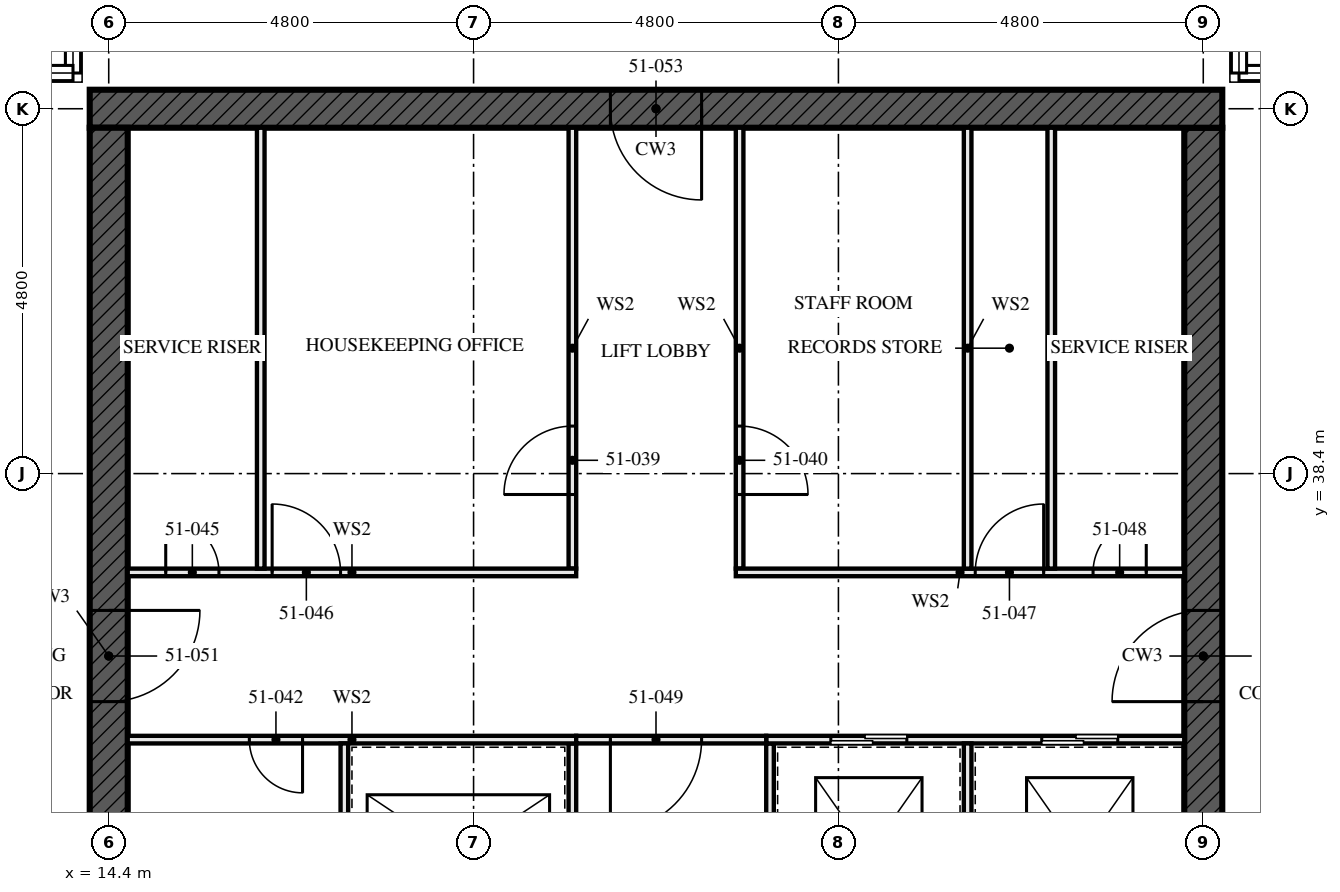
"""IFC4 building model, lengths in metres.
Left out: names, types, materials, properties, quantities, classifications, styles, units other than length and angle.
Written with IfcOpenShell. Run it as: python <this file> out.ifc"""

import sys

from ifc_helpers import new_model, si_unit, direction, frame, frame_2d, origin, place, context, subcontext, project, spatial, rectangle, extrude, element, fill, save


model = new_model("IFC4")
c1 = context("Model", 3, precision=1e-05, world=origin(), true_north=direction((0.0, 1.0)))
c2 = subcontext(c1, "Body", "Model", "MODEL_VIEW")
j1 = project(units=[si_unit("LENGTHUNIT", "METRE"), si_unit("PLANEANGLEUNIT", "RADIAN")], contexts=[c1])
p1 = place(None, origin())
s1 = spatial("IfcSite", under=j1, at=p1, CompositionType="ELEMENT")
p2 = place(p1, origin())
s2 = spatial("IfcBuilding", under=s1, at=p2, CompositionType="ELEMENT")
p3 = place(p2, frame((0.0, 0.0, 186.5)))
s3 = spatial("IfcBuildingStorey", under=s2, at=p3, CompositionType="ELEMENT", Elevation=186.5)
p4 = place(p3, frame((29.05, 43.2, -0.17), z_axis=(0.0, 0.0, 1.0), x_axis=(-1.0, 0.0, 0.0)))
e1 = element("IfcWall", 1, at=p4, inside=s3, PredefinedType="SHEAR", context=c2, shape_type="SweptSolid", body=[
    extrude(rectangle(XDim=14.9, YDim=0.5, at=frame_2d((7.45, 0.0))), origin(), (0.0, 0.0, 1.0), 3.42),
])
p5 = place(p4, frame((6.85, 0.0, 0.17)))
e2 = element("IfcOpeningElement", 2, at=p5, cuts=e1, PredefinedType="OPENING", context=c2, shape_type="SweptSolid", body=[
    extrude(rectangle(XDim=1.2, YDim=2.1, at=frame_2d((0.6, 1.05))), frame((0.0, 0.26, 0.0), z_axis=(0.0, -1.0, 0.0), x_axis=(1.0, 0.0, 0.0)), (0.0, 0.0, 1.0), 0.521),
])
p6 = place(p3, frame((14.4, 42.95, -0.17), z_axis=(0.0, 0.0, 1.0), x_axis=(0.0, -1.0, 0.0)))
e3 = element("IfcWall", 3, at=p6, inside=s3, PredefinedType="SHEAR", context=c2, shape_type="SweptSolid", body=[
    extrude(rectangle(XDim=13.9, YDim=0.5, at=frame_2d((6.95, 0.0))), origin(), (0.0, 0.0, 1.0), 3.42),
])
p7 = place(p6, frame((6.35, 0.0, 0.17)))
e4 = element("IfcOpeningElement", 4, at=p7, cuts=e3, PredefinedType="OPENING", context=c2, shape_type="SweptSolid", body=[
    extrude(rectangle(XDim=1.2, YDim=2.1, at=frame_2d((0.6, 1.05))), frame((0.0, 0.26, 0.0), z_axis=(0.0, -1.0, 0.0), x_axis=(1.0, 0.0, 0.0)), (0.0, 0.0, 1.0), 0.521),
])
p8 = place(p3, frame((28.8, 29.05, -0.17), z_axis=(0.0, 0.0, 1.0), x_axis=(0.0, 1.0, 0.0)))
e5 = element("IfcWall", 5, at=p8, inside=s3, PredefinedType="SHEAR", context=c2, shape_type="SweptSolid", body=[
    extrude(rectangle(XDim=13.9, YDim=0.5, at=frame_2d((6.95, 0.0))), origin(), (0.0, 0.0, 1.0), 3.42),
])
p9 = place(p8, frame((6.35, 0.0, 0.17)))
e6 = element("IfcOpeningElement", 6, at=p9, cuts=e5, PredefinedType="OPENING", context=c2, shape_type="SweptSolid", body=[
    extrude(rectangle(XDim=1.2, YDim=2.1, at=frame_2d((0.6, 1.05))), frame((0.0, 0.26, 0.0), z_axis=(0.0, -1.0, 0.0), x_axis=(1.0, 0.0, 0.0)), (0.0, 0.0, 1.0), 0.521),
])
for number, where, z_axis, x_axis in (
    (7, (16.4, 37.15, 0.0), (0.0, 0.0, 1.0), (0.0, 1.0, 0.0)),
    (8, (26.8, 37.15, 0.0), (0.0, 0.0, 1.0), (0.0, 1.0, 0.0)),
):
    element("IfcWall", number, at=place(p3, frame(where, z_axis=z_axis, x_axis=x_axis)), inside=s3, PredefinedType="SOLIDWALL", context=c2, shape_type="SweptSolid", body=[
        extrude(rectangle(XDim=5.8, YDim=0.1, at=frame_2d((2.9, 0.0))), origin(), (0.0, 0.0, 1.0), 3.25),
    ])
p10 = place(p3, frame((20.5, 29.05, 0.0), z_axis=(0.0, 0.0, 1.0), x_axis=(0.0, 1.0, 0.0)))
e9 = element("IfcWall", 9, at=p10, inside=s3, PredefinedType="SOLIDWALL", context=c2, shape_type="SweptSolid", body=[
    extrude(rectangle(XDim=5.8, YDim=0.1, at=frame_2d((2.9, 0.0))), origin(), (0.0, 0.0, 1.0), 3.25),
])
p11 = place(p10, frame((0.8, 0.0, 0.0)))
e10 = element("IfcOpeningElement", 10, at=p11, cuts=e9, PredefinedType="OPENING", context=c2, shape_type="SweptSolid", body=[
    extrude(rectangle(XDim=1.1, YDim=2.3, at=frame_2d((0.55, 1.15))), frame((0.0, 0.061, 0.0), z_axis=(0.0, -1.0, 0.0), x_axis=(1.0, 0.0, 0.0)), (0.0, 0.0, 1.0), 0.121),
])
p12 = place(p10, frame((3.775, 0.0, 0.0)))
e11 = element("IfcOpeningElement", 11, at=p12, cuts=e9, PredefinedType="OPENING", context=c2, shape_type="SweptSolid", body=[
    extrude(rectangle(XDim=1.1, YDim=2.3, at=frame_2d((0.55, 1.15))), frame((0.0, 0.061, 0.0), z_axis=(0.0, -1.0, 0.0), x_axis=(1.0, 0.0, 0.0)), (0.0, 0.0, 1.0), 0.121),
])
p13 = place(p3, frame((20.5, 37.15, 0.0), z_axis=(0.0, 0.0, 1.0), x_axis=(0.0, 1.0, 0.0)))
e12 = element("IfcWall", 12, at=p13, inside=s3, PredefinedType="SOLIDWALL", context=c2, shape_type="SweptSolid", body=[
    extrude(rectangle(XDim=5.8, YDim=0.1, at=frame_2d((2.9, 0.0))), origin(), (0.0, 0.0, 1.0), 3.25),
])
p14 = place(p13, frame((0.975, 0.0, 0.0)))
e13 = element("IfcOpeningElement", 13, at=p14, cuts=e12, PredefinedType="OPENING", context=c2, shape_type="SweptSolid", body=[
    extrude(rectangle(XDim=0.9, YDim=2.1, at=frame_2d((0.45, 1.05))), frame((0.0, 0.061, 0.0), z_axis=(0.0, -1.0, 0.0), x_axis=(1.0, 0.0, 0.0)), (0.0, 0.0, 1.0), 0.121),
])
p15 = place(p3, frame((22.7, 37.15, 0.0), z_axis=(0.0, 0.0, 1.0), x_axis=(0.0, 1.0, 0.0)))
e14 = element("IfcWall", 14, at=p15, inside=s3, PredefinedType="SOLIDWALL", context=c2, shape_type="SweptSolid", body=[
    extrude(rectangle(XDim=5.8, YDim=0.1, at=frame_2d((2.9, 0.0))), origin(), (0.0, 0.0, 1.0), 3.25),
])
p16 = place(p15, frame((0.975, 0.0, 0.0)))
e15 = element("IfcOpeningElement", 15, at=p16, cuts=e14, PredefinedType="OPENING", context=c2, shape_type="SweptSolid", body=[
    extrude(rectangle(XDim=0.9, YDim=2.1, at=frame_2d((0.45, 1.05))), frame((0.0, 0.061, 0.0), z_axis=(0.0, -1.0, 0.0), x_axis=(1.0, 0.0, 0.0)), (0.0, 0.0, 1.0), 0.121),
])
p17 = place(p3, frame((23.1, 29.05, 0.0), z_axis=(0.0, 0.0, 1.0), x_axis=(0.0, 1.0, 0.0)))
e16 = element("IfcWall", 16, at=p17, inside=s3, PredefinedType="SOLIDWALL", context=c2, shape_type="SweptSolid", body=[
    extrude(rectangle(XDim=5.8, YDim=0.1, at=frame_2d((2.9, 0.0))), origin(), (0.0, 0.0, 1.0), 3.25),
])
p18 = place(p17, frame((1.0, 0.0, 0.0)))
e17 = element("IfcOpeningElement", 17, at=p18, cuts=e16, PredefinedType="OPENING", context=c2, shape_type="SweptSolid", body=[
    extrude(rectangle(XDim=0.7, YDim=2.1, at=frame_2d((0.35, 1.05))), frame((0.0, 0.061, 0.0), z_axis=(0.0, -1.0, 0.0), x_axis=(1.0, 0.0, 0.0)), (0.0, 0.0, 1.0), 0.121),
])
p19 = place(p3, frame((14.65, 34.9, 0.0), z_axis=(0.0, 0.0, 1.0), x_axis=(1.0, 0.0, 0.0)))
e18 = element("IfcWall", 18, at=p19, inside=s3, PredefinedType="SOLIDWALL", context=c2, shape_type="SweptSolid", body=[
    extrude(rectangle(XDim=5.9, YDim=0.1, at=frame_2d((2.95, 0.0))), origin(), (0.0, 0.0, 1.0), 3.25),
])
p20 = place(p19, frame((1.6, 0.0, 0.0)))
e19 = element("IfcOpeningElement", 19, at=p20, cuts=e18, PredefinedType="OPENING", context=c2, shape_type="SweptSolid", body=[
    extrude(rectangle(XDim=0.7, YDim=2.1, at=frame_2d((0.35, 1.05))), frame((0.0, 0.061, 0.0), z_axis=(0.0, -1.0, 0.0), x_axis=(1.0, 0.0, 0.0)), (0.0, 0.0, 1.0), 0.121),
])
p21 = place(p3, frame((23.05, 34.9, 0.0), z_axis=(0.0, 0.0, 1.0), x_axis=(1.0, 0.0, 0.0)))
e20 = element("IfcWall", 20, at=p21, inside=s3, PredefinedType="SOLIDWALL", context=c2, shape_type="SweptSolid", body=[
    extrude(rectangle(XDim=5.5, YDim=0.1, at=frame_2d((2.75, 0.0))), origin(), (0.0, 0.0, 1.0), 3.25),
])
p22 = place(p21, frame((0.85, 0.0, 0.0)))
e21 = element("IfcOpeningElement", 21, at=p22, cuts=e20, PredefinedType="OPENING", context=c2, shape_type="SweptSolid", body=[
    extrude(rectangle(XDim=1.0, YDim=2.1, at=frame_2d((0.5, 1.05))), frame((0.0, 0.061, 0.0), z_axis=(0.0, -1.0, 0.0), x_axis=(1.0, 0.0, 0.0)), (0.0, 0.0, 1.0), 0.121),
])
p23 = place(p21, frame((3.625, 0.0, 0.0)))
e22 = element("IfcOpeningElement", 22, at=p23, cuts=e20, PredefinedType="OPENING", context=c2, shape_type="SweptSolid", body=[
    extrude(rectangle(XDim=1.0, YDim=2.1, at=frame_2d((0.5, 1.05))), frame((0.0, 0.061, 0.0), z_axis=(0.0, -1.0, 0.0), x_axis=(1.0, 0.0, 0.0)), (0.0, 0.0, 1.0), 0.121),
])
p24 = place(p3, frame((14.65, 37.1, 0.0), z_axis=(0.0, 0.0, 1.0), x_axis=(1.0, 0.0, 0.0)))
e23 = element("IfcWall", 23, at=p24, inside=s3, PredefinedType="SOLIDWALL", context=c2, shape_type="SweptSolid", body=[
    extrude(rectangle(XDim=5.9, YDim=0.1, at=frame_2d((2.95, 0.0))), origin(), (0.0, 0.0, 1.0), 3.25),
])
p25 = place(p24, frame((0.5, 0.0, 0.0)))
e24 = element("IfcOpeningElement", 24, at=p25, cuts=e23, PredefinedType="OPENING", context=c2, shape_type="SweptSolid", body=[
    extrude(rectangle(XDim=0.7, YDim=2.1, at=frame_2d((0.35, 1.05))), frame((0.0, 0.061, 0.0), z_axis=(0.0, -1.0, 0.0), x_axis=(1.0, 0.0, 0.0)), (0.0, 0.0, 1.0), 0.121),
])
p26 = place(p24, frame((1.9, 0.0, 0.0)))
e25 = element("IfcOpeningElement", 25, at=p26, cuts=e23, PredefinedType="OPENING", context=c2, shape_type="SweptSolid", body=[
    extrude(rectangle(XDim=0.9, YDim=2.1, at=frame_2d((0.45, 1.05))), frame((0.0, 0.061, 0.0), z_axis=(0.0, -1.0, 0.0), x_axis=(1.0, 0.0, 0.0)), (0.0, 0.0, 1.0), 0.121),
])
p27 = place(p3, frame((22.65, 37.1, 0.0), z_axis=(0.0, 0.0, 1.0), x_axis=(1.0, 0.0, 0.0)))
e26 = element("IfcWall", 26, at=p27, inside=s3, PredefinedType="SOLIDWALL", context=c2, shape_type="SweptSolid", body=[
    extrude(rectangle(XDim=5.9, YDim=0.1, at=frame_2d((2.95, 0.0))), origin(), (0.0, 0.0, 1.0), 3.25),
])
p28 = place(p27, frame((3.15, 0.0, 0.0)))
e27 = element("IfcOpeningElement", 27, at=p28, cuts=e26, PredefinedType="OPENING", context=c2, shape_type="SweptSolid", body=[
    extrude(rectangle(XDim=0.9, YDim=2.1, at=frame_2d((0.45, 1.05))), frame((0.0, 0.061, 0.0), z_axis=(0.0, -1.0, 0.0), x_axis=(1.0, 0.0, 0.0)), (0.0, 0.0, 1.0), 0.121),
])
p29 = place(p27, frame((4.7, 0.0, 0.0)))
e28 = element("IfcOpeningElement", 28, at=p29, cuts=e26, PredefinedType="OPENING", context=c2, shape_type="SweptSolid", body=[
    extrude(rectangle(XDim=0.7, YDim=2.1, at=frame_2d((0.35, 1.05))), frame((0.0, 0.061, 0.0), z_axis=(0.0, -1.0, 0.0), x_axis=(1.0, 0.0, 0.0)), (0.0, 0.0, 1.0), 0.121),
])
p30 = place(p3, frame((20.55, 34.9, 0.0), z_axis=(0.0, 0.0, 1.0), x_axis=(1.0, 0.0, 0.0)))
e29 = element("IfcWall", 29, at=p30, inside=s3, PredefinedType="SOLIDWALL", context=c2, shape_type="SweptSolid", body=[
    extrude(rectangle(XDim=2.5, YDim=0.1, at=frame_2d((1.25, 0.0))), origin(), (0.0, 0.0, 1.0), 3.25),
])
p31 = place(p30, frame((0.45, 0.0, 0.0)))
e30 = element("IfcOpeningElement", 30, at=p31, cuts=e29, PredefinedType="OPENING", context=c2, shape_type="SweptSolid", body=[
    extrude(rectangle(XDim=1.2, YDim=2.1, at=frame_2d((0.6, 1.05))), frame((0.0, 0.061, 0.0), z_axis=(0.0, -1.0, 0.0), x_axis=(1.0, 0.0, 0.0)), (0.0, 0.0, 1.0), 0.121),
])
for number, where, z_axis, x_axis in (
    (31, (17.5, 29.05, 0.0), (0.0, 0.0, 1.0), (0.0, 1.0, 0.0)),
    (32, (25.7, 37.15, 0.0), (0.0, 0.0, 1.0), (0.0, 1.0, 0.0)),
):
    element("IfcWall", number, at=place(p3, frame(where, z_axis=z_axis, x_axis=x_axis)), inside=s3, PredefinedType="SOLIDWALL", context=c2, shape_type="SweptSolid", body=[
        extrude(rectangle(XDim=5.8, YDim=0.1, at=frame_2d((2.9, 0.0))), origin(), (0.0, 0.0, 1.0), 3.25),
    ])
p32 = place(p3, frame((25.7, 31.95, 0.0), z_axis=(0.0, 0.0, 1.0), x_axis=(0.0, 1.0, 0.0)))
e33 = element("IfcWall", 33, at=p32, inside=s3, PredefinedType="SOLIDWALL", context=c2, shape_type="SweptSolid", body=[
    extrude(rectangle(XDim=2.9, YDim=0.1, at=frame_2d((1.45, 0.0))), origin(), (0.0, 0.0, 1.0), 3.25),
])
p33 = place(p14, origin())
e34 = element("IfcDoor", 34, at=p33, inside=s3, OperationType="SINGLE_SWING_RIGHT", PredefinedType="DOOR", context=c2, shape_type="SweptSolid", body=[
    extrude(rectangle(XDim=0.9, YDim=2.1, at=frame_2d((0.45, 1.05))), frame((0.0, 0.027, 0.0), z_axis=(0.0, -1.0, 0.0), x_axis=(1.0, 0.0, 0.0)), (0.0, 0.0, 1.0), 0.054),
])
fill(e13, e34)
p34 = place(p16, frame((0.9, 0.0, 0.0), z_axis=(0.0, 0.0, 1.0), x_axis=(-1.0, 0.0, 0.0)))
e35 = element("IfcDoor", 35, at=p34, inside=s3, OperationType="SINGLE_SWING_LEFT", PredefinedType="DOOR", context=c2, shape_type="SweptSolid", body=[
    extrude(rectangle(XDim=0.9, YDim=2.1, at=frame_2d((0.45, 1.05))), frame((0.0, 0.027, 0.0), z_axis=(0.0, -1.0, 0.0), x_axis=(1.0, 0.0, 0.0)), (0.0, 0.0, 1.0), 0.054),
])
fill(e15, e35)
p35 = place(p20, frame((0.7, 0.0, 0.0), z_axis=(0.0, 0.0, 1.0), x_axis=(-1.0, 0.0, 0.0)))
e36 = element("IfcDoor", 36, at=p35, inside=s3, OperationType="SINGLE_SWING_RIGHT", PredefinedType="DOOR", context=c2, shape_type="SweptSolid", body=[
    extrude(rectangle(XDim=0.7, YDim=2.1, at=frame_2d((0.35, 1.05))), frame((0.0, 0.027, 0.0), z_axis=(0.0, -1.0, 0.0), x_axis=(1.0, 0.0, 0.0)), (0.0, 0.0, 1.0), 0.054),
])
fill(e19, e36)
p36 = place(p22, origin())
e37 = element("IfcDoor", 37, at=p36, inside=s3, OperationType="SLIDING_TO_LEFT", PredefinedType="DOOR", context=c2, shape_type="SweptSolid", body=[
    extrude(rectangle(XDim=1.0, YDim=2.1, at=frame_2d((0.5, 1.05))), frame((0.0, 0.05, 0.0), z_axis=(0.0, -1.0, 0.0), x_axis=(1.0, 0.0, 0.0)), (0.0, 0.0, 1.0), 0.1),
])
fill(e21, e37)
p37 = place(p23, origin())
e38 = element("IfcDoor", 38, at=p37, inside=s3, OperationType="SLIDING_TO_LEFT", PredefinedType="DOOR", context=c2, shape_type="SweptSolid", body=[
    extrude(rectangle(XDim=1.0, YDim=2.1, at=frame_2d((0.5, 1.05))), frame((0.0, 0.05, 0.0), z_axis=(0.0, -1.0, 0.0), x_axis=(1.0, 0.0, 0.0)), (0.0, 0.0, 1.0), 0.1),
])
fill(e22, e38)
p38 = place(p25, origin())
e39 = element("IfcDoor", 39, at=p38, inside=s3, OperationType="SINGLE_SWING_RIGHT", PredefinedType="DOOR", context=c2, shape_type="SweptSolid", body=[
    extrude(rectangle(XDim=0.7, YDim=2.1, at=frame_2d((0.35, 1.05))), frame((0.0, 0.027, 0.0), z_axis=(0.0, -1.0, 0.0), x_axis=(1.0, 0.0, 0.0)), (0.0, 0.0, 1.0), 0.054),
])
fill(e24, e39)
p39 = place(p26, origin())
e40 = element("IfcDoor", 40, at=p39, inside=s3, OperationType="SINGLE_SWING_RIGHT", PredefinedType="DOOR", context=c2, shape_type="SweptSolid", body=[
    extrude(rectangle(XDim=0.9, YDim=2.1, at=frame_2d((0.45, 1.05))), frame((0.0, 0.027, 0.0), z_axis=(0.0, -1.0, 0.0), x_axis=(1.0, 0.0, 0.0)), (0.0, 0.0, 1.0), 0.054),
])
fill(e25, e40)
p40 = place(p28, origin())
e41 = element("IfcDoor", 41, at=p40, inside=s3, OperationType="SINGLE_SWING_LEFT", PredefinedType="DOOR", context=c2, shape_type="SweptSolid", body=[
    extrude(rectangle(XDim=0.9, YDim=2.1, at=frame_2d((0.45, 1.05))), frame((0.0, 0.027, 0.0), z_axis=(0.0, -1.0, 0.0), x_axis=(1.0, 0.0, 0.0)), (0.0, 0.0, 1.0), 0.054),
])
fill(e27, e41)
p41 = place(p29, origin())
e42 = element("IfcDoor", 42, at=p41, inside=s3, OperationType="SINGLE_SWING_LEFT", PredefinedType="DOOR", context=c2, shape_type="SweptSolid", body=[
    extrude(rectangle(XDim=0.7, YDim=2.1, at=frame_2d((0.35, 1.05))), frame((0.0, 0.027, 0.0), z_axis=(0.0, -1.0, 0.0), x_axis=(1.0, 0.0, 0.0)), (0.0, 0.0, 1.0), 0.054),
])
fill(e28, e42)
p42 = place(p31, frame((1.2, 0.0, 0.0), z_axis=(0.0, 0.0, 1.0), x_axis=(-1.0, 0.0, 0.0)))
e43 = element("IfcDoor", 43, at=p42, inside=s3, OperationType="SINGLE_SWING_LEFT", PredefinedType="DOOR", context=c2, shape_type="SweptSolid", body=[
    extrude(rectangle(XDim=1.2, YDim=2.1, at=frame_2d((0.6, 1.05))), frame((0.0, 0.027, 0.0), z_axis=(0.0, -1.0, 0.0), x_axis=(1.0, 0.0, 0.0)), (0.0, 0.0, 1.0), 0.054),
])
fill(e30, e43)
p43 = place(p7, origin())
e44 = element("IfcDoor", 44, at=p43, inside=s3, OperationType="SINGLE_SWING_LEFT", PredefinedType="DOOR", context=c2, shape_type="SweptSolid", body=[
    extrude(rectangle(XDim=1.2, YDim=2.1, at=frame_2d((0.6, 1.05))), frame((0.0, 0.027, 0.0), z_axis=(0.0, -1.0, 0.0), x_axis=(1.0, 0.0, 0.0)), (0.0, 0.0, 1.0), 0.054),
])
fill(e4, e44)
p44 = place(p9, origin())
e45 = element("IfcDoor", 45, at=p44, inside=s3, OperationType="SINGLE_SWING_LEFT", PredefinedType="DOOR", context=c2, shape_type="SweptSolid", body=[
    extrude(rectangle(XDim=1.2, YDim=2.1, at=frame_2d((0.6, 1.05))), frame((0.0, 0.027, 0.0), z_axis=(0.0, -1.0, 0.0), x_axis=(1.0, 0.0, 0.0)), (0.0, 0.0, 1.0), 0.054),
])
fill(e6, e45)
p45 = place(p5, origin())
e46 = element("IfcDoor", 46, at=p45, inside=s3, OperationType="SINGLE_SWING_LEFT", PredefinedType="DOOR", context=c2, shape_type="SweptSolid", body=[
    extrude(rectangle(XDim=1.2, YDim=2.1, at=frame_2d((0.6, 1.05))), frame((0.0, 0.027, 0.0), z_axis=(0.0, -1.0, 0.0), x_axis=(1.0, 0.0, 0.0)), (0.0, 0.0, 1.0), 0.054),
])
fill(e2, e46)
save(model, sys.argv[1])
